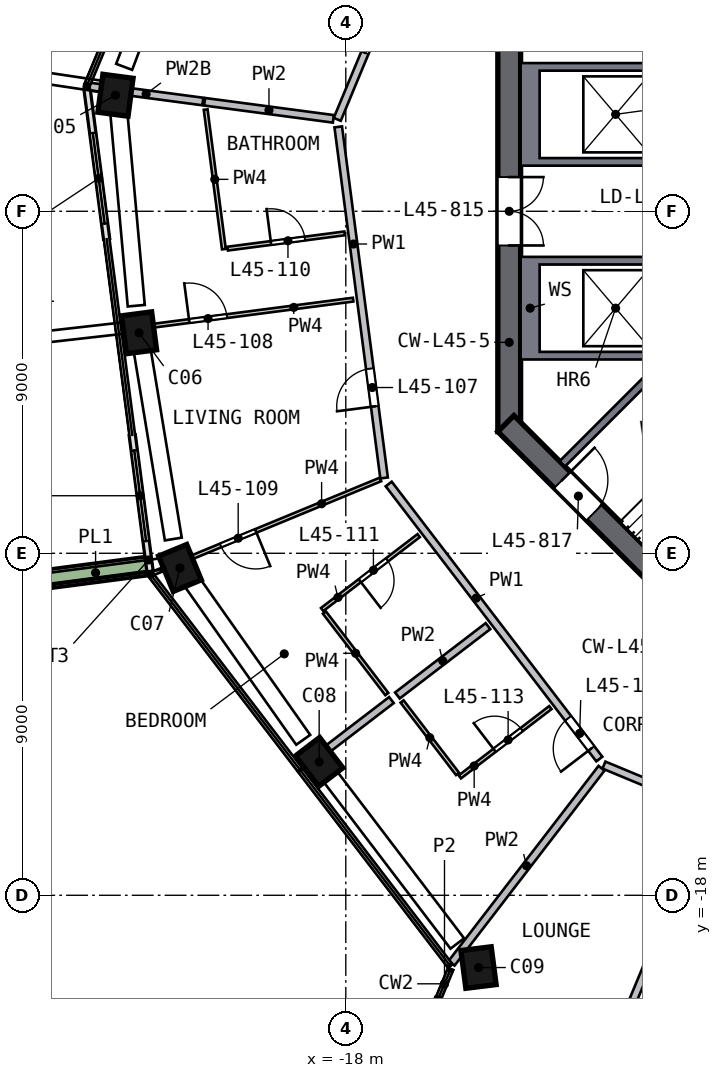
"""IFC4 building model, lengths in metres.
Left out: names, types, materials, properties, quantities, classifications, styles, units other than length and angle.
Written with IfcOpenShell. Run it as: python <this file> out.ifc"""

import sys

from ifc_helpers import new_model, si_unit, direction, frame, frame_2d, origin, origin_2d, place, context, subcontext, project, spatial, polyline, rectangle, outline, extrude, element, fill, save


model = new_model("IFC4")
c1 = context("Model", 3, precision=1e-05, world=origin(), true_north=direction((0.0, 1.0)))
c2 = subcontext(c1, "Body", "Model", "MODEL_VIEW")
j1 = project(units=[si_unit("LENGTHUNIT", "METRE"), si_unit("PLANEANGLEUNIT", "RADIAN")], contexts=[c1])
p1 = place(None, origin())
s1 = spatial("IfcSite", under=j1, at=p1, CompositionType="ELEMENT")
p2 = place(p1, origin())
s2 = spatial("IfcBuilding", under=s1, at=p2, CompositionType="ELEMENT")
p3 = place(p2, frame((0.0, 0.0, 187.0)))
s3 = spatial("IfcBuildingStorey", under=s2, at=p3, CompositionType="ELEMENT", Elevation=187.0)
p4 = place(p3, frame((-24.044, 3.191, 0.0), z_axis=(-0.014216387, -0.11449133, 0.993322521), x_axis=(0.130765561, 0.984678092, 0.115366475)))
e1 = element("IfcColumn", 1, at=p4, inside=s3, PredefinedType="COLUMN", context=c2, shape_type="SweptSolid", body=[
    extrude(rectangle(XDim=1.0, YDim=0.8, at=origin_2d()), origin(), (0.0, 0.0, 1.0), 3.211),
])
p5 = place(p3, frame((-23.459, -3.063, 0.0), z_axis=(0.015513818, -0.111486556, 0.993644841), x_axis=(0.128594241, -0.985289039, -0.112556785)))
e2 = element("IfcColumn", 2, at=p5, inside=s3, PredefinedType="COLUMN", context=c2, shape_type="SweptSolid", body=[
    extrude(rectangle(XDim=1.0, YDim=0.8, at=origin_2d()), origin(), (0.0, 0.0, 1.0), 3.21),
])
p6 = place(p3, frame((-22.418, -9.258, 0.0), z_axis=(0.044929776, -0.106280587, 0.993320569), x_axis=(-0.378999709, 0.918175321, 0.115383279)))
e3 = element("IfcColumn", 3, at=p6, inside=s3, PredefinedType="COLUMN", context=c2, shape_type="SweptSolid", body=[
    extrude(rectangle(XDim=1.0, YDim=0.8, at=origin_2d()), origin(), (0.0, 0.0, 1.0), 3.211),
])
p7 = place(p3, frame((-18.784, -14.383, 0.0), z_axis=(0.069128268, -0.088748833, 0.993652317), x_axis=(0.603927899, -0.789060783, -0.112490769)))
e4 = element("IfcColumn", 4, at=p7, inside=s3, PredefinedType="COLUMN", context=c2, shape_type="SweptSolid", body=[
    extrude(rectangle(XDim=1.0, YDim=0.8, at=origin_2d()), origin(), (0.0, 0.0, 1.0), 3.21),
])
p8 = place(p3, frame((-14.622, -19.819, 0.0), z_axis=(0.094782296, -0.068711464, 0.993123885), x_axis=(-0.122268831, 0.989258415, 0.080113182)))
e5 = element("IfcColumn", 5, at=p8, inside=s3, PredefinedType="COLUMN", context=c2, shape_type="SweptSolid", body=[
    extrude(rectangle(XDim=1.0, YDim=0.8, at=origin_2d()), origin(), (0.0, 0.0, 1.0), 3.212),
])
p9 = place(p3, frame((-13.7, 5.799, 0.0), z_axis=(0.0, 0.0, 1.0), x_axis=(0.0, -1.0, 0.0)))
e6 = element("IfcWall", 6, at=p9, inside=s3, PredefinedType="SHEAR", context=c2, shape_type="SweptSolid", body=[
    extrude(rectangle(XDim=11.598, YDim=0.6, at=frame_2d((5.799, 0.0))), origin(), (0.0, 0.0, 1.0), 3.5),
])
p10 = place(p9, frame((4.899, 0.0, 0.0)))
e7 = element("IfcOpeningElement", 7, at=p10, cuts=e6, PredefinedType="OPENING", context=c2, shape_type="SweptSolid", body=[
    extrude(rectangle(XDim=1.8, YDim=2.1, at=frame_2d((0.9, 1.05))), frame((0.0, 0.31, 0.0), z_axis=(0.0, -1.0, 0.0), x_axis=(1.0, 0.0, 0.0)), (0.0, 0.0, 1.0), 0.62),
])
p11 = place(p3, frame((-13.788, -5.587, 0.0), z_axis=(0.0, 0.0, 1.0), x_axis=(0.707106781, -0.707106781, 0.0)))
e8 = element("IfcWall", 8, at=p11, inside=s3, PredefinedType="SHEAR", context=c2, shape_type="SweptSolid", body=[
    extrude(rectangle(XDim=11.598, YDim=0.6, at=frame_2d((5.799, 0.0))), origin(), (0.0, 0.0, 1.0), 3.5),
])
p12 = place(p11, frame((2.099, 0.0, 0.0)))
e9 = element("IfcOpeningElement", 9, at=p12, cuts=e8, PredefinedType="OPENING", context=c2, shape_type="SweptSolid", body=[
    extrude(rectangle(XDim=1.2, YDim=2.1, at=frame_2d((0.6, 1.05))), frame((0.0, 0.31, 0.0), z_axis=(0.0, -1.0, 0.0), x_axis=(1.0, 0.0, 0.0)), (0.0, 0.0, 1.0), 0.62),
])
p13 = place(p3, frame((-15.664, -20.762, 0.0), z_axis=(0.0, 0.0, 1.0), x_axis=(0.923465492, -0.383681489, 0.0)))
e10 = element("IfcWall", 10, at=p13, inside=s3, PredefinedType="SOLIDWALL", context=c2, shape_type="SweptSolid", body=[
    extrude(rectangle(XDim=1.875, YDim=0.15, at=frame_2d((0.938, 0.0))), origin(), (0.0, 0.0, 1.0), 3.19),
])
p14 = place(p3, frame((-24.808, 3.215, 0.0), z_axis=(0.0, 0.0, 1.0), x_axis=(0.129470718, -0.991583246, 0.0)))
e11 = element("IfcWall", 11, at=p14, inside=s3, PredefinedType="SOLIDWALL", context=c2, shape_type="SweptSolid", body=[
    extrude(rectangle(XDim=3.968, YDim=0.15, at=frame_2d((1.984, 0.0))), origin(), (0.0, 0.0, 1.0), 2.475),
])
p15 = place(p14, frame((1.167, 0.0, 0.0)))
e12 = element("IfcOpeningElement", 12, at=p15, cuts=e11, PredefinedType="OPENING", context=c2, shape_type="SweptSolid", body=[
    extrude(rectangle(XDim=2.4, YDim=2.4, at=frame_2d((1.2, 1.2))), frame((0.0, 0.085, 0.0), z_axis=(0.0, -1.0, 0.0), x_axis=(1.0, 0.0, 0.0)), (0.0, 0.0, 1.0), 0.17),
])
p16 = place(p3, frame((-23.618, -5.899, 0.0), z_axis=(0.0, 0.0, 1.0), x_axis=(0.129495372, -0.991580026, 0.0)))
e13 = element("IfcWall", 13, at=p16, inside=s3, PredefinedType="SOLIDWALL", context=c2, shape_type="SweptSolid", body=[
    extrude(rectangle(XDim=3.608, YDim=0.15, at=frame_2d((1.804, 0.0))), origin(), (0.0, 0.0, 1.0), 2.475),
])
p17 = place(p16, frame((0.4, 0.0, 0.0)))
e14 = element("IfcOpeningElement", 14, at=p17, cuts=e13, PredefinedType="OPENING", context=c2, shape_type="SweptSolid", body=[
    extrude(rectangle(XDim=2.4, YDim=2.4, at=frame_2d((1.2, 1.2))), frame((0.0, 0.085, 0.0), z_axis=(0.0, -1.0, 0.0), x_axis=(1.0, 0.0, 0.0)), (0.0, 0.0, 1.0), 0.17),
])
p18 = place(p3, frame((-22.824, 15.979, 0.0), z_axis=(0.0, 0.0, 1.0), x_axis=(-0.383658168, -0.923475181, 0.0)))
e15 = element("IfcWall", 15, at=p18, inside=s3, PredefinedType="SOLIDWALL", context=c2, shape_type="SweptSolid", body=[
    extrude(rectangle(XDim=13.223, YDim=0.5, at=frame_2d((6.612, 0.0))), origin(), (0.0, 0.0, 1.0), 0.7),
])
p19 = place(p3, frame((-25.922, -9.688, 0.0), z_axis=(0.0, 0.0, 1.0), x_axis=(0.991575172, 0.129532535, 0.0)))
e16 = element("IfcWall", 16, at=p19, inside=s3, PredefinedType="SOLIDWALL", context=c2, shape_type="SweptSolid", body=[
    extrude(rectangle(XDim=2.699, YDim=0.5, at=frame_2d((1.35, 0.0))), origin(), (0.0, 0.0, 1.0), 0.7),
])
p20 = place(p3, origin())
e17 = element("IfcWall", 17, at=p20, inside=s3, PredefinedType="SOLIDWALL", context=c2, shape_type="SweptSolid", body=[
    extrude(outline(polyline([(-13.4, 3.9), (-9.9, 3.9), (-9.9, 3.7), (-12.9, 3.7), (-12.9, 1.4), (-9.9, 1.4), (-9.9, 1.2), (-13.4, 1.2), (-13.4, 3.9)])), origin(), (0.0, 0.0, 1.0), 3.19),
])
p21 = place(p3, origin())
e18 = element("IfcWall", 18, at=p21, inside=s3, PredefinedType="SOLIDWALL", context=c2, shape_type="SweptSolid", body=[
    extrude(outline(polyline([(-13.4, -3.9), (-13.4, -1.2), (-9.9, -1.2), (-9.9, -1.4), (-12.9, -1.4), (-12.9, -3.7), (-9.9, -3.7), (-9.9, -3.9), (-13.4, -3.9)])), origin(), (0.0, 0.0, 1.0), 3.19),
])
p22 = place(p3, frame((-9.334, -3.677, 0.0), z_axis=(0.0, 0.0, 1.0), x_axis=(-0.707135845, -0.707077716, 0.0)))
e19 = element("IfcWall", 19, at=p22, inside=s3, PredefinedType="SOLIDWALL", context=c2, shape_type="SweptSolid", body=[
    extrude(rectangle(XDim=4.2, YDim=0.2, at=frame_2d((2.1, 0.0))), origin(), (0.0, 0.0, 1.0), 3.19),
])
p23 = place(p3, frame((-16.993, -7.018, 0.0), z_axis=(0.0, 0.0, 1.0), x_axis=(-0.129502741, 0.991579064, 0.0)))
e20 = element("IfcWall", 20, at=p23, inside=s3, PredefinedType="SOLIDWALL", context=c2, shape_type="SweptSolid", body=[
    extrude(rectangle(XDim=9.317, YDim=0.2, at=frame_2d((4.658, 0.0))), origin(), (0.0, 0.0, 1.0), 3.19),
])
p24 = place(p23, frame((1.9, 0.0, 0.0)))
e21 = element("IfcOpeningElement", 21, at=p24, cuts=e20, PredefinedType="OPENING", context=c2, shape_type="SweptSolid", body=[
    extrude(rectangle(XDim=1.0, YDim=2.1, at=frame_2d((0.5, 1.05))), frame((0.0, 0.11, 0.0), z_axis=(0.0, -1.0, 0.0), x_axis=(1.0, 0.0, 0.0)), (0.0, 0.0, 1.0), 0.22),
])
p25 = place(p3, frame((-18.225, 2.419, 0.0), z_axis=(0.0, 0.0, 1.0), x_axis=(0.383660652, 0.923474149, 0.0)))
e22 = element("IfcWall", 22, at=p25, inside=s3, PredefinedType="SOLIDWALL", context=c2, shape_type="SweptSolid", body=[
    extrude(rectangle(XDim=9.317, YDim=0.2, at=frame_2d((4.658, 0.0))), origin(), (0.0, 0.0, 1.0), 3.19),
])
p26 = place(p25, frame((1.9, 0.0, 0.0)))
e23 = element("IfcOpeningElement", 23, at=p26, cuts=e22, PredefinedType="OPENING", context=c2, shape_type="SweptSolid", body=[
    extrude(rectangle(XDim=1.0, YDim=2.1, at=frame_2d((0.5, 1.05))), frame((0.0, 0.11, 0.0), z_axis=(0.0, -1.0, 0.0), x_axis=(1.0, 0.0, 0.0)), (0.0, 0.0, 1.0), 0.22),
])
p27 = place(p3, frame((-11.329, -14.415, 0.0), z_axis=(0.0, 0.0, 1.0), x_axis=(-0.607927122, 0.79399283, 0.0)))
e24 = element("IfcWall", 24, at=p27, inside=s3, PredefinedType="SOLIDWALL", context=c2, shape_type="SweptSolid", body=[
    extrude(rectangle(XDim=9.117, YDim=0.2, at=frame_2d((4.558, 0.0))), origin(), (0.0, 0.0, 1.0), 3.19),
])
p28 = place(p27, frame((0.35, 0.0, 0.0)))
e25 = element("IfcOpeningElement", 25, at=p28, cuts=e24, PredefinedType="OPENING", context=c2, shape_type="SweptSolid", body=[
    extrude(rectangle(XDim=1.0, YDim=2.1, at=frame_2d((0.5, 1.05))), frame((0.0, 0.11, 0.0), z_axis=(0.0, -1.0, 0.0), x_axis=(1.0, 0.0, 0.0)), (0.0, 0.0, 1.0), 0.22),
])
p29 = place(p3, frame((-2.419, -18.225, 0.0), z_axis=(0.0, 0.0, 1.0), x_axis=(-0.923478679, 0.383649748, 0.0)))
e26 = element("IfcWall", 26, at=p29, inside=s3, PredefinedType="SOLIDWALL", context=c2, shape_type="SweptSolid", body=[
    extrude(rectangle(XDim=9.517, YDim=0.2, at=frame_2d((4.758, 0.0))), origin(), (0.0, 0.0, 1.0), 3.19),
])
p30 = place(p29, frame((3.869, 0.0, 0.0)))
e27 = element("IfcOpeningElement", 27, at=p30, cuts=e26, PredefinedType="OPENING", context=c2, shape_type="SweptSolid", body=[
    extrude(rectangle(XDim=1.8, YDim=2.1, at=frame_2d((0.9, 1.05))), frame((0.0, 0.11, 0.0), z_axis=(0.0, -1.0, 0.0), x_axis=(1.0, 0.0, 0.0)), (0.0, 0.0, 1.0), 0.22),
])
p31 = place(p3, frame((-21.762, 2.888, 0.0), z_axis=(0.0, 0.0, 1.0), x_axis=(-0.991306316, 0.131574268, 0.0)))
e28 = element("IfcWall", 28, at=p31, inside=s3, PredefinedType="SOLIDWALL", context=c2, shape_type="SweptSolid", body=[
    extrude(rectangle(XDim=3.011, YDim=0.2, at=frame_2d((1.506, 0.0))), origin(), (0.0, 0.0, 1.0), 2.69),
])
p32 = place(p3, frame((-18.328, 2.432, 0.0), z_axis=(0.0, 0.0, 1.0), x_axis=(-0.991308802, 0.131555534, 0.0)))
e29 = element("IfcWall", 29, at=p32, inside=s3, PredefinedType="SOLIDWALL", context=c2, shape_type="SweptSolid", body=[
    extrude(rectangle(XDim=3.418, YDim=0.2, at=frame_2d((1.709, 0.0))), origin(), (0.0, 0.0, 1.0), 3.19),
])
p33 = place(p3, frame((-16.8, -12.863, 0.0), z_axis=(0.0, 0.0, 1.0), x_axis=(-0.793981836, -0.607941481, 0.0)))
e30 = element("IfcWall", 30, at=p33, inside=s3, PredefinedType="SOLIDWALL", context=c2, shape_type="SweptSolid", body=[
    extrude(rectangle(XDim=2.95, YDim=0.2, at=frame_2d((1.475, 0.0))), origin(), (0.0, 0.0, 1.0), 3.19),
])
p34 = place(p3, frame((-14.259, -10.917, 0.0), z_axis=(0.0, 0.0, 1.0), x_axis=(-0.793997581, -0.607920917, 0.0)))
e31 = element("IfcWall", 31, at=p34, inside=s3, PredefinedType="SOLIDWALL", context=c2, shape_type="SweptSolid", body=[
    extrude(rectangle(XDim=3.002, YDim=0.2, at=frame_2d((1.501, 0.0))), origin(), (0.0, 0.0, 1.0), 3.19),
])
p35 = place(p3, frame((-15.218, -19.789, 0.0), z_axis=(0.0, 0.0, 1.0), x_axis=(0.609619659, 0.792694059, 0.0)))
e32 = element("IfcWall", 32, at=p35, inside=s3, PredefinedType="SOLIDWALL", context=c2, shape_type="SweptSolid", body=[
    extrude(rectangle(XDim=6.476, YDim=0.2, at=frame_2d((3.238, 0.0))), origin(), (0.0, 0.0, 1.0), 3.19),
])
p36 = place(p3, frame((-12.561, -25.869, 0.0), z_axis=(0.0, 0.0, 1.0), x_axis=(0.383637915, 0.923483595, 0.0)))
e33 = element("IfcWall", 33, at=p36, inside=s3, PredefinedType="SOLIDWALL", context=c2, shape_type="SweptSolid", body=[
    extrude(rectangle(XDim=10.75, YDim=0.2, at=frame_2d((5.375, 0.0))), origin(), (0.0, 0.0, 1.0), 2.69),
])
p37 = place(p36, frame((1.95, 0.0, 0.0)))
e34 = element("IfcOpeningElement", 34, at=p37, cuts=e33, PredefinedType="OPENING", context=c2, shape_type="SweptSolid", body=[
    extrude(rectangle(XDim=1.0, YDim=2.1, at=frame_2d((0.5, 1.05))), frame((0.0, 0.11, 0.0), z_axis=(0.0, -1.0, 0.0), x_axis=(1.0, 0.0, 0.0)), (0.0, 0.0, 1.0), 0.22),
])
p38 = place(p3, frame((-21.688, 2.677, 0.0), z_axis=(0.0, 0.0, 1.0), x_axis=(0.129460357, -0.991584598, 0.0)))
e35 = element("IfcWall", 35, at=p38, inside=s3, PredefinedType="PARTITIONING", context=c2, shape_type="SweptSolid", body=[
    extrude(rectangle(XDim=3.704, YDim=0.1, at=frame_2d((1.852, 0.0))), origin(), (0.0, 0.0, 1.0), 3.19),
])
p39 = place(p3, frame((-23.906, -3.122, 0.0), z_axis=(0.0, 0.0, 1.0), x_axis=(0.991585795, 0.12945119, 0.0)))
e36 = element("IfcWall", 36, at=p39, inside=s3, PredefinedType="PARTITIONING", context=c2, shape_type="SweptSolid", body=[
    extrude(rectangle(XDim=6.15, YDim=0.1, at=frame_2d((3.075, 0.0))), origin(), (0.0, 0.0, 1.0), 3.19),
])
p40 = place(p39, frame((1.8, 0.0, 0.0)))
e37 = element("IfcOpeningElement", 37, at=p40, cuts=e36, PredefinedType="OPENING", context=c2, shape_type="SweptSolid", body=[
    extrude(rectangle(XDim=1.0, YDim=2.1, at=frame_2d((0.5, 1.05))), frame((0.0, 0.06, 0.0), z_axis=(0.0, -1.0, 0.0), x_axis=(1.0, 0.0, 0.0)), (0.0, 0.0, 1.0), 0.12),
])
p41 = place(p3, frame((-17.088, -7.057, 0.0), z_axis=(0.0, 0.0, 1.0), x_axis=(-0.924277042, -0.381722347, 0.0)))
e38 = element("IfcWall", 38, at=p41, inside=s3, PredefinedType="PARTITIONING", context=c2, shape_type="SweptSolid", body=[
    extrude(rectangle(XDim=6.476, YDim=0.1, at=frame_2d((3.238, 0.0))), origin(), (0.0, 0.0, 1.0), 3.19),
])
p42 = place(p41, frame((3.55, 0.0, 0.0)))
e39 = element("IfcOpeningElement", 39, at=p42, cuts=e38, PredefinedType="OPENING", context=c2, shape_type="SweptSolid", body=[
    extrude(rectangle(XDim=1.0, YDim=2.1, at=frame_2d((0.5, 1.05))), frame((0.0, 0.06, 0.0), z_axis=(0.0, -1.0, 0.0), x_axis=(1.0, 0.0, 0.0)), (0.0, 0.0, 1.0), 0.12),
])
p43 = place(p3, frame((-21.109, -0.983, 0.0), z_axis=(0.0, 0.0, 1.0), x_axis=(0.991571841, 0.129558036, 0.0)))
e40 = element("IfcWall", 40, at=p43, inside=s3, PredefinedType="PARTITIONING", context=c2, shape_type="SweptSolid", body=[
    extrude(rectangle(XDim=3.1, YDim=0.1, at=frame_2d((1.55, 0.0))), origin(), (0.0, 0.0, 1.0), 3.19),
])
p44 = place(p43, frame((1.15, 0.0, 0.0)))
e41 = element("IfcOpeningElement", 41, at=p44, cuts=e40, PredefinedType="OPENING", context=c2, shape_type="SweptSolid", body=[
    extrude(rectangle(XDim=0.9, YDim=2.1, at=frame_2d((0.45, 1.05))), frame((0.0, 0.06, 0.0), z_axis=(0.0, -1.0, 0.0), x_axis=(1.0, 0.0, 0.0)), (0.0, 0.0, 1.0), 0.12),
])
p45 = place(p3, frame((-18.562, -10.56, 0.0), z_axis=(0.0, 0.0, 1.0), x_axis=(0.607913175, -0.794003509, 0.0)))
e42 = element("IfcWall", 42, at=p45, inside=s3, PredefinedType="PARTITIONING", context=c2, shape_type="SweptSolid", body=[
    extrude(rectangle(XDim=2.7, YDim=0.1, at=frame_2d((1.35, 0.0))), origin(), (0.0, 0.0, 1.0), 3.19),
])
p46 = place(p3, frame((-16.083, -8.535, 0.0), z_axis=(0.0, 0.0, 1.0), x_axis=(-0.794000376, -0.607917267, 0.0)))
e43 = element("IfcWall", 43, at=p46, inside=s3, PredefinedType="PARTITIONING", context=c2, shape_type="SweptSolid", body=[
    extrude(rectangle(XDim=3.2, YDim=0.1, at=frame_2d((1.6, 0.0))), origin(), (0.0, 0.0, 1.0), 3.19),
])
p47 = place(p46, frame((1.05, 0.0, 0.0)))
e44 = element("IfcOpeningElement", 44, at=p47, cuts=e43, PredefinedType="OPENING", context=c2, shape_type="SweptSolid", body=[
    extrude(rectangle(XDim=0.9, YDim=2.1, at=frame_2d((0.45, 1.05))), frame((0.0, 0.06, 0.0), z_axis=(0.0, -1.0, 0.0), x_axis=(1.0, 0.0, 0.0)), (0.0, 0.0, 1.0), 0.12),
])
p48 = place(p3, frame((-15.06, -14.806, 0.0), z_axis=(0.0, 0.0, 1.0), x_axis=(-0.607880442, 0.794028569, 0.0)))
e45 = element("IfcWall", 45, at=p48, inside=s3, PredefinedType="PARTITIONING", context=c2, shape_type="SweptSolid", body=[
    extrude(rectangle(XDim=2.4, YDim=0.1, at=frame_2d((1.2, 0.0))), origin(), (0.0, 0.0, 1.0), 3.19),
])
p49 = place(p3, frame((-14.999, -14.885, 0.0), z_axis=(0.0, 0.0, 1.0), x_axis=(0.794013533, 0.607900081, 0.0)))
e46 = element("IfcWall", 46, at=p49, inside=s3, PredefinedType="PARTITIONING", context=c2, shape_type="SweptSolid", body=[
    extrude(rectangle(XDim=3.0, YDim=0.1, at=frame_2d((1.5, 0.0))), origin(), (0.0, 0.0, 1.0), 3.19),
])
p50 = place(p49, frame((1.15, 0.0, 0.0)))
e47 = element("IfcOpeningElement", 47, at=p50, cuts=e46, PredefinedType="OPENING", context=c2, shape_type="SweptSolid", body=[
    extrude(rectangle(XDim=0.9, YDim=2.1, at=frame_2d((0.45, 1.05))), frame((0.0, 0.06, 0.0), z_axis=(0.0, -1.0, 0.0), x_axis=(1.0, 0.0, 0.0)), (0.0, 0.0, 1.0), 0.12),
])
p51 = place(p15, origin())
e48 = element("IfcDoor", 48, at=p51, inside=s3, OperationType="SLIDING_TO_LEFT", PredefinedType="DOOR", context=c2, shape_type="SweptSolid", body=[
    extrude(rectangle(XDim=2.4, YDim=2.4, at=frame_2d((1.2, 1.2))), frame((0.0, 0.025, 0.0), z_axis=(0.0, -1.0, 0.0), x_axis=(1.0, 0.0, 0.0)), (0.0, 0.0, 1.0), 0.05),
])
fill(e12, e48)
p52 = place(p17, origin())
e49 = element("IfcDoor", 49, at=p52, inside=s3, OperationType="SLIDING_TO_RIGHT", PredefinedType="DOOR", context=c2, shape_type="SweptSolid", body=[
    extrude(rectangle(XDim=2.4, YDim=2.4, at=frame_2d((1.2, 1.2))), frame((0.0, 0.025, 0.0), z_axis=(0.0, -1.0, 0.0), x_axis=(1.0, 0.0, 0.0)), (0.0, 0.0, 1.0), 0.05),
])
fill(e14, e49)
p53 = place(p10, origin())
e50 = element("IfcDoor", 50, at=p53, inside=s3, OperationType="DOUBLE_DOOR_SINGLE_SWING", PredefinedType="DOOR", context=c2, shape_type="SweptSolid", body=[
    extrude(rectangle(XDim=1.8, YDim=2.1, at=frame_2d((0.9, 1.05))), frame((0.0, 0.025, 0.0), z_axis=(0.0, -1.0, 0.0), x_axis=(1.0, 0.0, 0.0)), (0.0, 0.0, 1.0), 0.05),
])
fill(e7, e50)
p54 = place(p12, origin())
e51 = element("IfcDoor", 51, at=p54, inside=s3, OperationType="SINGLE_SWING_LEFT", PredefinedType="DOOR", context=c2, shape_type="SweptSolid", body=[
    extrude(rectangle(XDim=1.2, YDim=2.1, at=frame_2d((0.6, 1.05))), frame((0.0, 0.025, 0.0), z_axis=(0.0, -1.0, 0.0), x_axis=(1.0, 0.0, 0.0)), (0.0, 0.0, 1.0), 0.05),
])
fill(e9, e51)
p55 = place(p26, origin())
e52 = element("IfcDoor", 52, at=p55, inside=s3, OperationType="SINGLE_SWING_LEFT", PredefinedType="DOOR", context=c2, shape_type="SweptSolid", body=[
    extrude(rectangle(XDim=1.0, YDim=2.1, at=frame_2d((0.5, 1.05))), frame((0.0, 0.025, 0.0), z_axis=(0.0, -1.0, 0.0), x_axis=(1.0, 0.0, 0.0)), (0.0, 0.0, 1.0), 0.05),
])
fill(e23, e52)
p56 = place(p24, origin())
e53 = element("IfcDoor", 53, at=p56, inside=s3, OperationType="SINGLE_SWING_LEFT", PredefinedType="DOOR", context=c2, shape_type="SweptSolid", body=[
    extrude(rectangle(XDim=1.0, YDim=2.1, at=frame_2d((0.5, 1.05))), frame((0.0, 0.025, 0.0), z_axis=(0.0, -1.0, 0.0), x_axis=(1.0, 0.0, 0.0)), (0.0, 0.0, 1.0), 0.05),
])
fill(e21, e53)
p57 = place(p40, origin())
e54 = element("IfcDoor", 54, at=p57, inside=s3, OperationType="SINGLE_SWING_LEFT", PredefinedType="DOOR", context=c2, shape_type="SweptSolid", body=[
    extrude(rectangle(XDim=1.0, YDim=2.1, at=frame_2d((0.5, 1.05))), frame((0.0, 0.025, 0.0), z_axis=(0.0, -1.0, 0.0), x_axis=(1.0, 0.0, 0.0)), (0.0, 0.0, 1.0), 0.05),
])
fill(e37, e54)
p58 = place(p42, origin())
e55 = element("IfcDoor", 55, at=p58, inside=s3, OperationType="SINGLE_SWING_LEFT", PredefinedType="DOOR", context=c2, shape_type="SweptSolid", body=[
    extrude(rectangle(XDim=1.0, YDim=2.1, at=frame_2d((0.5, 1.05))), frame((0.0, 0.025, 0.0), z_axis=(0.0, -1.0, 0.0), x_axis=(1.0, 0.0, 0.0)), (0.0, 0.0, 1.0), 0.05),
])
fill(e39, e55)
p59 = place(p44, origin())
e56 = element("IfcDoor", 56, at=p59, inside=s3, OperationType="SINGLE_SWING_LEFT", PredefinedType="DOOR", context=c2, shape_type="SweptSolid", body=[
    extrude(rectangle(XDim=0.9, YDim=2.1, at=frame_2d((0.45, 1.05))), frame((0.0, 0.025, 0.0), z_axis=(0.0, -1.0, 0.0), x_axis=(1.0, 0.0, 0.0)), (0.0, 0.0, 1.0), 0.05),
])
fill(e41, e56)
p60 = place(p47, origin())
e57 = element("IfcDoor", 57, at=p60, inside=s3, OperationType="SINGLE_SWING_RIGHT", PredefinedType="DOOR", context=c2, shape_type="SweptSolid", body=[
    extrude(rectangle(XDim=0.9, YDim=2.1, at=frame_2d((0.45, 1.05))), frame((0.0, 0.025, 0.0), z_axis=(0.0, -1.0, 0.0), x_axis=(1.0, 0.0, 0.0)), (0.0, 0.0, 1.0), 0.05),
])
fill(e44, e57)
p61 = place(p28, origin())
e58 = element("IfcDoor", 58, at=p61, inside=s3, OperationType="SINGLE_SWING_LEFT", PredefinedType="DOOR", context=c2, shape_type="SweptSolid", body=[
    extrude(rectangle(XDim=1.0, YDim=2.1, at=frame_2d((0.5, 1.05))), frame((0.0, 0.025, 0.0), z_axis=(0.0, -1.0, 0.0), x_axis=(1.0, 0.0, 0.0)), (0.0, 0.0, 1.0), 0.05),
])
fill(e25, e58)
p62 = place(p50, origin())
e59 = element("IfcDoor", 59, at=p62, inside=s3, OperationType="SINGLE_SWING_LEFT", PredefinedType="DOOR", context=c2, shape_type="SweptSolid", body=[
    extrude(rectangle(XDim=0.9, YDim=2.1, at=frame_2d((0.45, 1.05))), frame((0.0, 0.025, 0.0), z_axis=(0.0, -1.0, 0.0), x_axis=(1.0, 0.0, 0.0)), (0.0, 0.0, 1.0), 0.05),
])
fill(e47, e59)
save(model, sys.argv[1])
